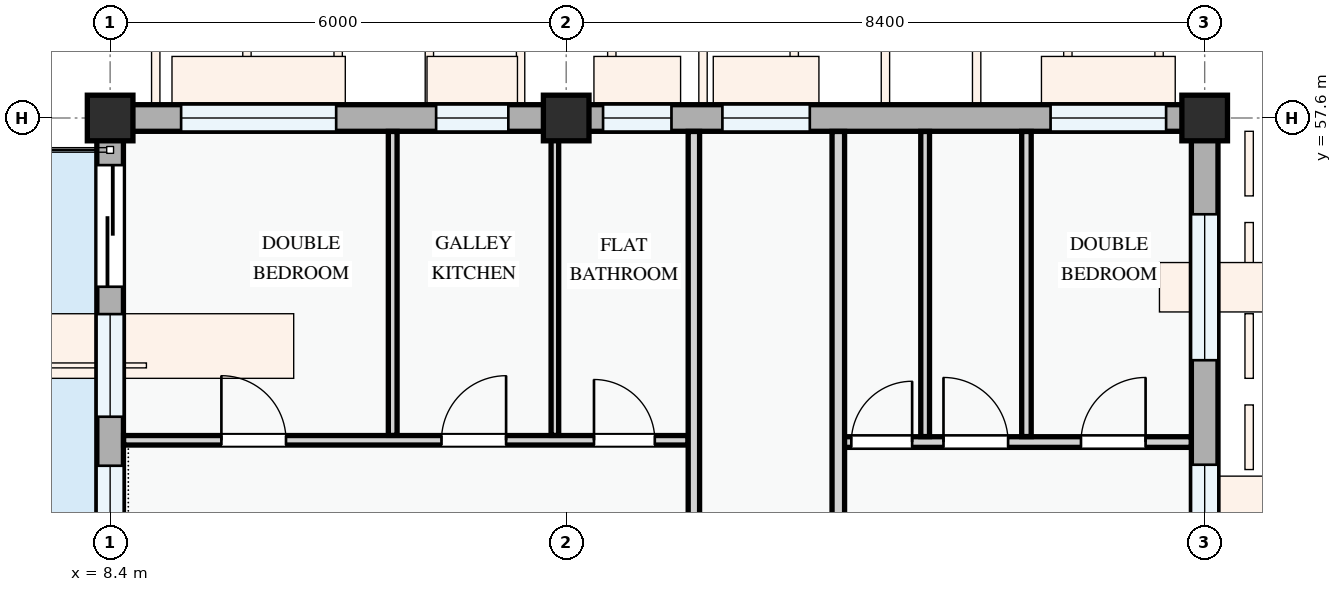
"""IFC4 building model, lengths in metres.
Left out: names, types, materials, properties, quantities, classifications, styles, units other than length and angle.
Written with IfcOpenShell. Run it as: python <this file> out.ifc"""

import sys

from ifc_helpers import new_model, si_unit, direction, frame, frame_2d, origin, origin_2d, place, context, subcontext, project, spatial, rectangle, extrude, element, fill, save


model = new_model("IFC4")
c1 = context("Model", 3, precision=1e-05, world=origin(), true_north=direction((0.0, 1.0)))
c2 = subcontext(c1, "Body", "Model", "MODEL_VIEW")
j1 = project(units=[si_unit("LENGTHUNIT", "METRE"), si_unit("PLANEANGLEUNIT", "RADIAN")], contexts=[c1])
p1 = place(None, origin())
s1 = spatial("IfcSite", under=j1, at=p1, CompositionType="ELEMENT")
p2 = place(p1, origin())
s2 = spatial("IfcBuilding", under=s1, at=p2, CompositionType="ELEMENT")
p3 = place(p2, frame((0.0, 0.0, 8.1)))
s3 = spatial("IfcBuildingStorey", under=s2, at=p3, CompositionType="ELEMENT", Elevation=8.1)
for number, where, z_axis, x_axis in (
    (1, (8.4, 57.6, 0.0), (0.0, 0.0, 1.0), (1.0, 0.0, 0.0)),
    (2, (14.4, 57.6, 0.0), (0.0, 0.0, 1.0), (1.0, 0.0, 0.0)),
    (3, (22.8, 57.6, 0.0), (0.0, 0.0, 1.0), (1.0, 0.0, 0.0)),
):
    element("IfcColumn", number, at=place(p3, frame(where, z_axis=z_axis, x_axis=x_axis)), inside=s3, PredefinedType="COLUMN", context=c2, shape_type="SweptSolid", body=[
        extrude(rectangle(XDim=0.6, YDim=0.6, at=origin_2d()), origin(), (0.0, 0.0, 1.0), 3.3),
    ])
p4 = place(p3, frame((22.8, 51.6, 0.0), z_axis=(0.0, 0.0, 1.0), x_axis=(0.0, 1.0, 0.0)))
e4 = element("IfcWall", 4, at=p4, inside=s3, PredefinedType="STANDARD", context=c2, shape_type="SweptSolid", body=[
    extrude(rectangle(XDim=6.0, YDim=0.35, at=frame_2d((3.0, 0.0))), origin(), (0.0, 0.0, 1.0), 2.575),
])
p5 = place(p4, frame((0.488, 0.0, 0.78)))
e5 = element("IfcOpeningElement", 5, at=p5, cuts=e4, PredefinedType="OPENING", context=c2, shape_type="SweptSolid", body=[
    extrude(rectangle(XDim=0.95, YDim=1.15, at=frame_2d((0.475, 0.575))), frame((0.0, 0.185, 0.0), z_axis=(0.0, -1.0, 0.0), x_axis=(1.0, 0.0, 0.0)), (0.0, 0.0, 1.0), 0.37),
])
p6 = place(p4, frame((2.813, 0.0, 0.78)))
e6 = element("IfcOpeningElement", 6, at=p6, cuts=e4, PredefinedType="OPENING", context=c2, shape_type="SweptSolid", body=[
    extrude(rectangle(XDim=1.92, YDim=1.44, at=frame_2d((0.96, 0.72))), frame((0.0, 0.185, 0.0), z_axis=(0.0, -1.0, 0.0), x_axis=(1.0, 0.0, 0.0)), (0.0, 0.0, 1.0), 0.37),
])
p7 = place(p3, frame((22.8, 57.6, 0.0), z_axis=(0.0, 0.0, 1.0), x_axis=(-1.0, 0.0, 0.0)))
e7 = element("IfcWall", 7, at=p7, inside=s3, PredefinedType="STANDARD", context=c2, shape_type="SweptSolid", body=[
    extrude(rectangle(XDim=8.4, YDim=0.35, at=frame_2d((4.2, 0.0))), origin(), (0.0, 0.0, 1.0), 2.375),
])
p8 = place(p7, frame((0.507, 0.0, 0.78)))
e8 = element("IfcOpeningElement", 8, at=p8, cuts=e7, PredefinedType="OPENING", context=c2, shape_type="SweptSolid", body=[
    extrude(rectangle(XDim=1.52, YDim=1.42, at=frame_2d((0.76, 0.71))), frame((0.0, 0.185, 0.0), z_axis=(0.0, -1.0, 0.0), x_axis=(1.0, 0.0, 0.0)), (0.0, 0.0, 1.0), 0.37),
])
p9 = place(p7, frame((5.195, 0.0, 0.78)))
e9 = element("IfcOpeningElement", 9, at=p9, cuts=e7, PredefinedType="OPENING", context=c2, shape_type="SweptSolid", body=[
    extrude(rectangle(XDim=1.15, YDim=1.25, at=frame_2d((0.575, 0.625))), frame((0.0, 0.185, 0.0), z_axis=(0.0, -1.0, 0.0), x_axis=(1.0, 0.0, 0.0)), (0.0, 0.0, 1.0), 0.37),
])
p10 = place(p7, frame((7.015, 0.0, 0.78)))
e10 = element("IfcOpeningElement", 10, at=p10, cuts=e7, PredefinedType="OPENING", context=c2, shape_type="SweptSolid", body=[
    extrude(rectangle(XDim=0.9, YDim=1.2, at=frame_2d((0.45, 0.6))), frame((0.0, 0.185, 0.0), z_axis=(0.0, -1.0, 0.0), x_axis=(1.0, 0.0, 0.0)), (0.0, 0.0, 1.0), 0.37),
])
p11 = place(p3, frame((14.4, 57.6, 0.0), z_axis=(0.0, 0.0, 1.0), x_axis=(-1.0, 0.0, 0.0)))
e11 = element("IfcWall", 11, at=p11, inside=s3, PredefinedType="STANDARD", context=c2, shape_type="SweptSolid", body=[
    extrude(rectangle(XDim=6.0, YDim=0.35, at=frame_2d((3.0, 0.0))), origin(), (0.0, 0.0, 1.0), 2.475),
])
p12 = place(p11, frame((0.761, 0.0, 0.78)))
e12 = element("IfcOpeningElement", 12, at=p12, cuts=e11, PredefinedType="OPENING", context=c2, shape_type="SweptSolid", body=[
    extrude(rectangle(XDim=0.95, YDim=1.15, at=frame_2d((0.475, 0.575))), frame((0.0, 0.185, 0.0), z_axis=(0.0, -1.0, 0.0), x_axis=(1.0, 0.0, 0.0)), (0.0, 0.0, 1.0), 0.37),
])
p13 = place(p11, frame((3.026, 0.0, 0.78)))
e13 = element("IfcOpeningElement", 13, at=p13, cuts=e11, PredefinedType="OPENING", context=c2, shape_type="SweptSolid", body=[
    extrude(rectangle(XDim=2.04, YDim=1.46, at=frame_2d((1.02, 0.73))), frame((0.0, 0.185, 0.0), z_axis=(0.0, -1.0, 0.0), x_axis=(1.0, 0.0, 0.0)), (0.0, 0.0, 1.0), 0.37),
])
p14 = place(p3, frame((8.4, 57.6, 0.0), z_axis=(0.0, 0.0, 1.0), x_axis=(0.0, -1.0, 0.0)))
e14 = element("IfcWall", 14, at=p14, inside=s3, PredefinedType="STANDARD", context=c2, shape_type="SweptSolid", body=[
    extrude(rectangle(XDim=6.0, YDim=0.35, at=frame_2d((3.0, 0.0))), origin(), (0.0, 0.0, 1.0), 2.445),
])
p15 = place(p14, frame((0.62, 0.0, 0.0)))
e15 = element("IfcOpeningElement", 15, at=p15, cuts=e14, PredefinedType="OPENING", context=c2, shape_type="SweptSolid", body=[
    extrude(rectangle(XDim=1.6, YDim=2.2, at=frame_2d((0.8, 1.1))), frame((0.0, 0.185, 0.0), z_axis=(0.0, -1.0, 0.0), x_axis=(1.0, 0.0, 0.0)), (0.0, 0.0, 1.0), 0.37),
])
p16 = place(p14, frame((2.58, 0.0, 0.78)))
e16 = element("IfcOpeningElement", 16, at=p16, cuts=e14, PredefinedType="OPENING", context=c2, shape_type="SweptSolid", body=[
    extrude(rectangle(XDim=1.35, YDim=1.55, at=frame_2d((0.675, 0.775))), frame((0.0, 0.185, 0.0), z_axis=(0.0, -1.0, 0.0), x_axis=(1.0, 0.0, 0.0)), (0.0, 0.0, 1.0), 0.37),
])
p17 = place(p14, frame((4.575, 0.0, 0.78)))
e17 = element("IfcOpeningElement", 17, at=p17, cuts=e14, PredefinedType="OPENING", context=c2, shape_type="SweptSolid", body=[
    extrude(rectangle(XDim=0.9, YDim=1.2, at=frame_2d((0.45, 0.6))), frame((0.0, 0.185, 0.0), z_axis=(0.0, -1.0, 0.0), x_axis=(1.0, 0.0, 0.0)), (0.0, 0.0, 1.0), 0.37),
])
p18 = place(p3, frame((8.577, 53.36, 0.0), z_axis=(0.0, 0.0, 1.0), x_axis=(1.0, 0.0, 0.0)))
e18 = element("IfcWall", 18, at=p18, inside=s3, PredefinedType="PARTITIONING", context=c2, shape_type="SweptSolid", body=[
    extrude(rectangle(XDim=7.426, YDim=0.125, at=frame_2d((3.713, 0.0))), origin(), (0.0, 0.0, 1.0), 3.0),
])
p19 = place(p18, frame((1.287, 0.0, 0.0)))
e19 = element("IfcOpeningElement", 19, at=p19, cuts=e18, PredefinedType="OPENING", context=c2, shape_type="SweptSolid", body=[
    extrude(rectangle(XDim=0.85, YDim=2.1, at=frame_2d((0.425, 1.05))), frame((0.0, 0.073, 0.0), z_axis=(0.0, -1.0, 0.0), x_axis=(1.0, 0.0, 0.0)), (0.0, 0.0, 1.0), 0.145),
])
p20 = place(p18, frame((4.182, 0.0, 0.0)))
e20 = element("IfcOpeningElement", 20, at=p20, cuts=e18, PredefinedType="OPENING", context=c2, shape_type="SweptSolid", body=[
    extrude(rectangle(XDim=0.85, YDim=2.1, at=frame_2d((0.425, 1.05))), frame((0.0, 0.073, 0.0), z_axis=(0.0, -1.0, 0.0), x_axis=(1.0, 0.0, 0.0)), (0.0, 0.0, 1.0), 0.145),
])
p21 = place(p18, frame((6.189, 0.0, 0.0)))
e21 = element("IfcOpeningElement", 21, at=p21, cuts=e18, PredefinedType="OPENING", context=c2, shape_type="SweptSolid", body=[
    extrude(rectangle(XDim=0.8, YDim=2.1, at=frame_2d((0.4, 1.05))), frame((0.0, 0.073, 0.0), z_axis=(0.0, -1.0, 0.0), x_axis=(1.0, 0.0, 0.0)), (0.0, 0.0, 1.0), 0.145),
])
p22 = place(p3, frame((12.118, 53.425, 0.0), z_axis=(0.0, 0.0, 1.0), x_axis=(0.0, 1.0, 0.0)))
e22 = element("IfcWall", 22, at=p22, inside=s3, PredefinedType="PARTITIONING", context=c2, shape_type="SweptSolid", body=[
    extrude(rectangle(XDim=3.999, YDim=0.115, at=frame_2d((1.999, 0.0))), origin(), (0.0, 0.0, 1.0), 3.0),
])
p23 = place(p3, frame((14.251, 53.425, 0.0), z_axis=(0.0, 0.0, 1.0), x_axis=(0.0, 1.0, 0.0)))
e23 = element("IfcWall", 23, at=p23, inside=s3, PredefinedType="PARTITIONING", context=c2, shape_type="SweptSolid", body=[
    extrude(rectangle(XDim=3.999, YDim=0.1, at=frame_2d((1.999, 0.0))), origin(), (0.0, 0.0, 1.0), 2.575),
])
p24 = place(p3, frame((17.98, 53.337, 0.0), z_axis=(0.0, 0.0, 1.0), x_axis=(1.0, 0.0, 0.0)))
e24 = element("IfcWall", 24, at=p24, inside=s3, PredefinedType="PARTITIONING", context=c2, shape_type="SweptSolid", body=[
    extrude(rectangle(XDim=4.643, YDim=0.14, at=frame_2d((2.322, 0.0))), origin(), (0.0, 0.0, 1.0), 3.0),
])
p25 = place(p24, frame((0.171, 0.0, 0.0)))
e25 = element("IfcOpeningElement", 25, at=p25, cuts=e24, PredefinedType="OPENING", context=c2, shape_type="SweptSolid", body=[
    extrude(rectangle(XDim=0.8, YDim=2.1, at=frame_2d((0.4, 1.05))), frame((0.0, 0.08, 0.0), z_axis=(0.0, -1.0, 0.0), x_axis=(1.0, 0.0, 0.0)), (0.0, 0.0, 1.0), 0.16),
])
p26 = place(p24, frame((1.384, 0.0, 0.0)))
e26 = element("IfcOpeningElement", 26, at=p26, cuts=e24, PredefinedType="OPENING", context=c2, shape_type="SweptSolid", body=[
    extrude(rectangle(XDim=0.85, YDim=2.1, at=frame_2d((0.425, 1.05))), frame((0.0, 0.08, 0.0), z_axis=(0.0, -1.0, 0.0), x_axis=(1.0, 0.0, 0.0)), (0.0, 0.0, 1.0), 0.16),
])
p27 = place(p24, frame((3.193, 0.0, 0.0)))
e27 = element("IfcOpeningElement", 27, at=p27, cuts=e24, PredefinedType="OPENING", context=c2, shape_type="SweptSolid", body=[
    extrude(rectangle(XDim=0.85, YDim=2.1, at=frame_2d((0.425, 1.05))), frame((0.0, 0.08, 0.0), z_axis=(0.0, -1.0, 0.0), x_axis=(1.0, 0.0, 0.0)), (0.0, 0.0, 1.0), 0.16),
])
p28 = place(p3, frame((20.455, 53.409, 0.0), z_axis=(0.0, 0.0, 1.0), x_axis=(0.0, 1.0, 0.0)))
e28 = element("IfcWall", 28, at=p28, inside=s3, PredefinedType="PARTITIONING", context=c2, shape_type="SweptSolid", body=[
    extrude(rectangle(XDim=4.014, YDim=0.125, at=frame_2d((2.007, 0.0))), origin(), (0.0, 0.0, 1.0), 3.0),
])
p29 = place(p3, frame((19.122, 53.409, 0.0), z_axis=(0.0, 0.0, 1.0), x_axis=(0.0, 1.0, 0.0)))
e29 = element("IfcWall", 29, at=p29, inside=s3, PredefinedType="PARTITIONING", context=c2, shape_type="SweptSolid", body=[
    extrude(rectangle(XDim=4.014, YDim=0.115, at=frame_2d((2.007, 0.0))), origin(), (0.0, 0.0, 1.0), 3.0),
])
p30 = place(p3, frame((16.08, 22.66, 0.0), z_axis=(0.0, 0.0, 1.0), x_axis=(0.0, 1.0, 0.0)))
e30 = element("IfcWall", 30, at=p30, inside=s3, PredefinedType="PARTITIONING", context=c2, shape_type="SweptSolid", body=[
    extrude(rectangle(XDim=34.763, YDim=0.15, at=frame_2d((17.382, 0.0))), origin(), (0.0, 0.0, 1.0), 3.0),
])
p31 = place(p30, frame((2.672, 0.0, 0.0)))
e31 = element("IfcOpeningElement", 31, at=p31, cuts=e30, PredefinedType="OPENING", context=c2, shape_type="SweptSolid", body=[
    extrude(rectangle(XDim=0.96, YDim=2.12, at=frame_2d((0.48, 1.06))), frame((0.0, 0.085, 0.0), z_axis=(0.0, -1.0, 0.0), x_axis=(1.0, 0.0, 0.0)), (0.0, 0.0, 1.0), 0.17),
])
p32 = place(p30, frame((16.58, 0.0, 0.0)))
e32 = element("IfcOpeningElement", 32, at=p32, cuts=e30, PredefinedType="OPENING", context=c2, shape_type="SweptSolid", body=[
    extrude(rectangle(XDim=0.92, YDim=2.1, at=frame_2d((0.46, 1.05))), frame((0.0, 0.085, 0.0), z_axis=(0.0, -1.0, 0.0), x_axis=(1.0, 0.0, 0.0)), (0.0, 0.0, 1.0), 0.17),
])
p33 = place(p30, frame((24.315, 0.0, 0.0)))
e33 = element("IfcOpeningElement", 33, at=p33, cuts=e30, PredefinedType="OPENING", context=c2, shape_type="SweptSolid", body=[
    extrude(rectangle(XDim=0.92, YDim=2.1, at=frame_2d((0.46, 1.05))), frame((0.0, 0.085, 0.0), z_axis=(0.0, -1.0, 0.0), x_axis=(1.0, 0.0, 0.0)), (0.0, 0.0, 1.0), 0.17),
])
p34 = place(p3, frame((17.98, 22.66, 0.0), z_axis=(0.0, 0.0, 1.0), x_axis=(0.0, 1.0, 0.0)))
e34 = element("IfcWall", 34, at=p34, inside=s3, PredefinedType="PARTITIONING", context=c2, shape_type="SweptSolid", body=[
    extrude(rectangle(XDim=34.763, YDim=0.165, at=frame_2d((17.382, 0.0))), origin(), (0.0, 0.0, 1.0), 3.0),
])
p35 = place(p34, frame((2.633, 0.0, 0.0)))
e35 = element("IfcOpeningElement", 35, at=p35, cuts=e34, PredefinedType="OPENING", context=c2, shape_type="SweptSolid", body=[
    extrude(rectangle(XDim=0.92, YDim=2.1, at=frame_2d((0.46, 1.05))), frame((0.0, 0.093, 0.0), z_axis=(0.0, -1.0, 0.0), x_axis=(1.0, 0.0, 0.0)), (0.0, 0.0, 1.0), 0.185),
])
p36 = place(p34, frame((16.343, 0.0, 0.0)))
e36 = element("IfcOpeningElement", 36, at=p36, cuts=e34, PredefinedType="OPENING", context=c2, shape_type="SweptSolid", body=[
    extrude(rectangle(XDim=0.92, YDim=2.1, at=frame_2d((0.46, 1.05))), frame((0.0, 0.093, 0.0), z_axis=(0.0, -1.0, 0.0), x_axis=(1.0, 0.0, 0.0)), (0.0, 0.0, 1.0), 0.185),
])
p37 = place(p34, frame((24.313, 0.0, 0.0)))
e37 = element("IfcOpeningElement", 37, at=p37, cuts=e34, PredefinedType="OPENING", context=c2, shape_type="SweptSolid", body=[
    extrude(rectangle(XDim=0.96, YDim=2.12, at=frame_2d((0.48, 1.06))), frame((0.0, 0.093, 0.0), z_axis=(0.0, -1.0, 0.0), x_axis=(1.0, 0.0, 0.0)), (0.0, 0.0, 1.0), 0.185),
])
p38 = place(p5, origin())
e38 = element("IfcWindow", 38, at=p38, inside=s3, PartitioningType="SINGLE_PANEL", PredefinedType="WINDOW", context=c2, shape_type="SweptSolid", body=[
    extrude(rectangle(XDim=0.95, YDim=1.15, at=frame_2d((0.475, 0.575))), frame((0.0, 0.03, 0.0), z_axis=(0.0, -1.0, 0.0), x_axis=(1.0, 0.0, 0.0)), (0.0, 0.0, 1.0), 0.06),
])
fill(e5, e38)
p39 = place(p6, origin())
e39 = element("IfcWindow", 39, at=p39, inside=s3, PartitioningType="DOUBLE_PANEL_VERTICAL", PredefinedType="WINDOW", context=c2, shape_type="SweptSolid", body=[
    extrude(rectangle(XDim=1.92, YDim=1.44, at=frame_2d((0.96, 0.72))), frame((0.0, 0.03, 0.0), z_axis=(0.0, -1.0, 0.0), x_axis=(1.0, 0.0, 0.0)), (0.0, 0.0, 1.0), 0.06),
])
fill(e6, e39)
p40 = place(p8, origin())
e40 = element("IfcWindow", 40, at=p40, inside=s3, PartitioningType="SINGLE_PANEL", PredefinedType="WINDOW", context=c2, shape_type="SweptSolid", body=[
    extrude(rectangle(XDim=1.52, YDim=1.42, at=frame_2d((0.76, 0.71))), frame((0.0, 0.03, 0.0), z_axis=(0.0, -1.0, 0.0), x_axis=(1.0, 0.0, 0.0)), (0.0, 0.0, 1.0), 0.06),
])
fill(e8, e40)
p41 = place(p9, origin())
e41 = element("IfcWindow", 41, at=p41, inside=s3, PartitioningType="SINGLE_PANEL", PredefinedType="WINDOW", context=c2, shape_type="SweptSolid", body=[
    extrude(rectangle(XDim=1.15, YDim=1.25, at=frame_2d((0.575, 0.625))), frame((0.0, 0.03, 0.0), z_axis=(0.0, -1.0, 0.0), x_axis=(1.0, 0.0, 0.0)), (0.0, 0.0, 1.0), 0.06),
])
fill(e9, e41)
p42 = place(p10, origin())
e42 = element("IfcWindow", 42, at=p42, inside=s3, PartitioningType="SINGLE_PANEL", PredefinedType="WINDOW", context=c2, shape_type="SweptSolid", body=[
    extrude(rectangle(XDim=0.9, YDim=1.2, at=frame_2d((0.45, 0.6))), frame((0.0, 0.03, 0.0), z_axis=(0.0, -1.0, 0.0), x_axis=(1.0, 0.0, 0.0)), (0.0, 0.0, 1.0), 0.06),
])
fill(e10, e42)
p43 = place(p12, origin())
e43 = element("IfcWindow", 43, at=p43, inside=s3, PartitioningType="SINGLE_PANEL", PredefinedType="WINDOW", context=c2, shape_type="SweptSolid", body=[
    extrude(rectangle(XDim=0.95, YDim=1.15, at=frame_2d((0.475, 0.575))), frame((0.0, 0.03, 0.0), z_axis=(0.0, -1.0, 0.0), x_axis=(1.0, 0.0, 0.0)), (0.0, 0.0, 1.0), 0.06),
])
fill(e12, e43)
p44 = place(p13, origin())
e44 = element("IfcWindow", 44, at=p44, inside=s3, PartitioningType="DOUBLE_PANEL_VERTICAL", PredefinedType="WINDOW", context=c2, shape_type="SweptSolid", body=[
    extrude(rectangle(XDim=2.04, YDim=1.46, at=frame_2d((1.02, 0.73))), frame((0.0, 0.03, 0.0), z_axis=(0.0, -1.0, 0.0), x_axis=(1.0, 0.0, 0.0)), (0.0, 0.0, 1.0), 0.06),
])
fill(e13, e44)
p45 = place(p15, frame((1.6, 0.0, 0.0), z_axis=(0.0, 0.0, 1.0), x_axis=(-1.0, 0.0, 0.0)))
e45 = element("IfcDoor", 45, at=p45, inside=s3, OperationType="SLIDING_TO_LEFT", PredefinedType="DOOR", context=c2, shape_type="SweptSolid", body=[
    extrude(rectangle(XDim=1.6, YDim=2.2, at=frame_2d((0.8, 1.1))), frame((0.0, 0.025, 0.0), z_axis=(0.0, -1.0, 0.0), x_axis=(1.0, 0.0, 0.0)), (0.0, 0.0, 1.0), 0.05),
])
fill(e15, e45)
p46 = place(p16, origin())
e46 = element("IfcWindow", 46, at=p46, inside=s3, PartitioningType="SINGLE_PANEL", PredefinedType="WINDOW", context=c2, shape_type="SweptSolid", body=[
    extrude(rectangle(XDim=1.35, YDim=1.55, at=frame_2d((0.675, 0.775))), frame((0.0, 0.03, 0.0), z_axis=(0.0, -1.0, 0.0), x_axis=(1.0, 0.0, 0.0)), (0.0, 0.0, 1.0), 0.06),
])
fill(e16, e46)
p47 = place(p17, origin())
e47 = element("IfcWindow", 47, at=p47, inside=s3, PartitioningType="SINGLE_PANEL", PredefinedType="WINDOW", context=c2, shape_type="SweptSolid", body=[
    extrude(rectangle(XDim=0.9, YDim=1.2, at=frame_2d((0.45, 0.6))), frame((0.0, 0.03, 0.0), z_axis=(0.0, -1.0, 0.0), x_axis=(1.0, 0.0, 0.0)), (0.0, 0.0, 1.0), 0.06),
])
fill(e17, e47)
p48 = place(p19, origin())
e48 = element("IfcDoor", 48, at=p48, inside=s3, OperationType="SINGLE_SWING_LEFT", PredefinedType="DOOR", context=c2, shape_type="SweptSolid", body=[
    extrude(rectangle(XDim=0.85, YDim=2.1, at=frame_2d((0.425, 1.05))), frame((0.0, 0.025, 0.0), z_axis=(0.0, -1.0, 0.0), x_axis=(1.0, 0.0, 0.0)), (0.0, 0.0, 1.0), 0.05),
])
fill(e19, e48)
p49 = place(p20, origin())
e49 = element("IfcDoor", 49, at=p49, inside=s3, OperationType="SINGLE_SWING_RIGHT", PredefinedType="DOOR", context=c2, shape_type="SweptSolid", body=[
    extrude(rectangle(XDim=0.85, YDim=2.1, at=frame_2d((0.425, 1.05))), frame((0.0, 0.025, 0.0), z_axis=(0.0, -1.0, 0.0), x_axis=(1.0, 0.0, 0.0)), (0.0, 0.0, 1.0), 0.05),
])
fill(e20, e49)
p50 = place(p21, origin())
e50 = element("IfcDoor", 50, at=p50, inside=s3, OperationType="SINGLE_SWING_LEFT", PredefinedType="DOOR", context=c2, shape_type="SweptSolid", body=[
    extrude(rectangle(XDim=0.8, YDim=2.1, at=frame_2d((0.4, 1.05))), frame((0.0, 0.025, 0.0), z_axis=(0.0, -1.0, 0.0), x_axis=(1.0, 0.0, 0.0)), (0.0, 0.0, 1.0), 0.05),
])
fill(e21, e50)
p51 = place(p25, origin())
e51 = element("IfcDoor", 51, at=p51, inside=s3, OperationType="SINGLE_SWING_RIGHT", PredefinedType="DOOR", context=c2, shape_type="SweptSolid", body=[
    extrude(rectangle(XDim=0.8, YDim=2.1, at=frame_2d((0.4, 1.05))), frame((0.0, 0.025, 0.0), z_axis=(0.0, -1.0, 0.0), x_axis=(1.0, 0.0, 0.0)), (0.0, 0.0, 1.0), 0.05),
])
fill(e25, e51)
p52 = place(p26, origin())
e52 = element("IfcDoor", 52, at=p52, inside=s3, OperationType="SINGLE_SWING_LEFT", PredefinedType="DOOR", context=c2, shape_type="SweptSolid", body=[
    extrude(rectangle(XDim=0.85, YDim=2.1, at=frame_2d((0.425, 1.05))), frame((0.0, 0.025, 0.0), z_axis=(0.0, -1.0, 0.0), x_axis=(1.0, 0.0, 0.0)), (0.0, 0.0, 1.0), 0.05),
])
fill(e26, e52)
p53 = place(p27, origin())
e53 = element("IfcDoor", 53, at=p53, inside=s3, OperationType="SINGLE_SWING_RIGHT", PredefinedType="DOOR", context=c2, shape_type="SweptSolid", body=[
    extrude(rectangle(XDim=0.85, YDim=2.1, at=frame_2d((0.425, 1.05))), frame((0.0, 0.025, 0.0), z_axis=(0.0, -1.0, 0.0), x_axis=(1.0, 0.0, 0.0)), (0.0, 0.0, 1.0), 0.05),
])
fill(e27, e53)
save(model, sys.argv[1])
